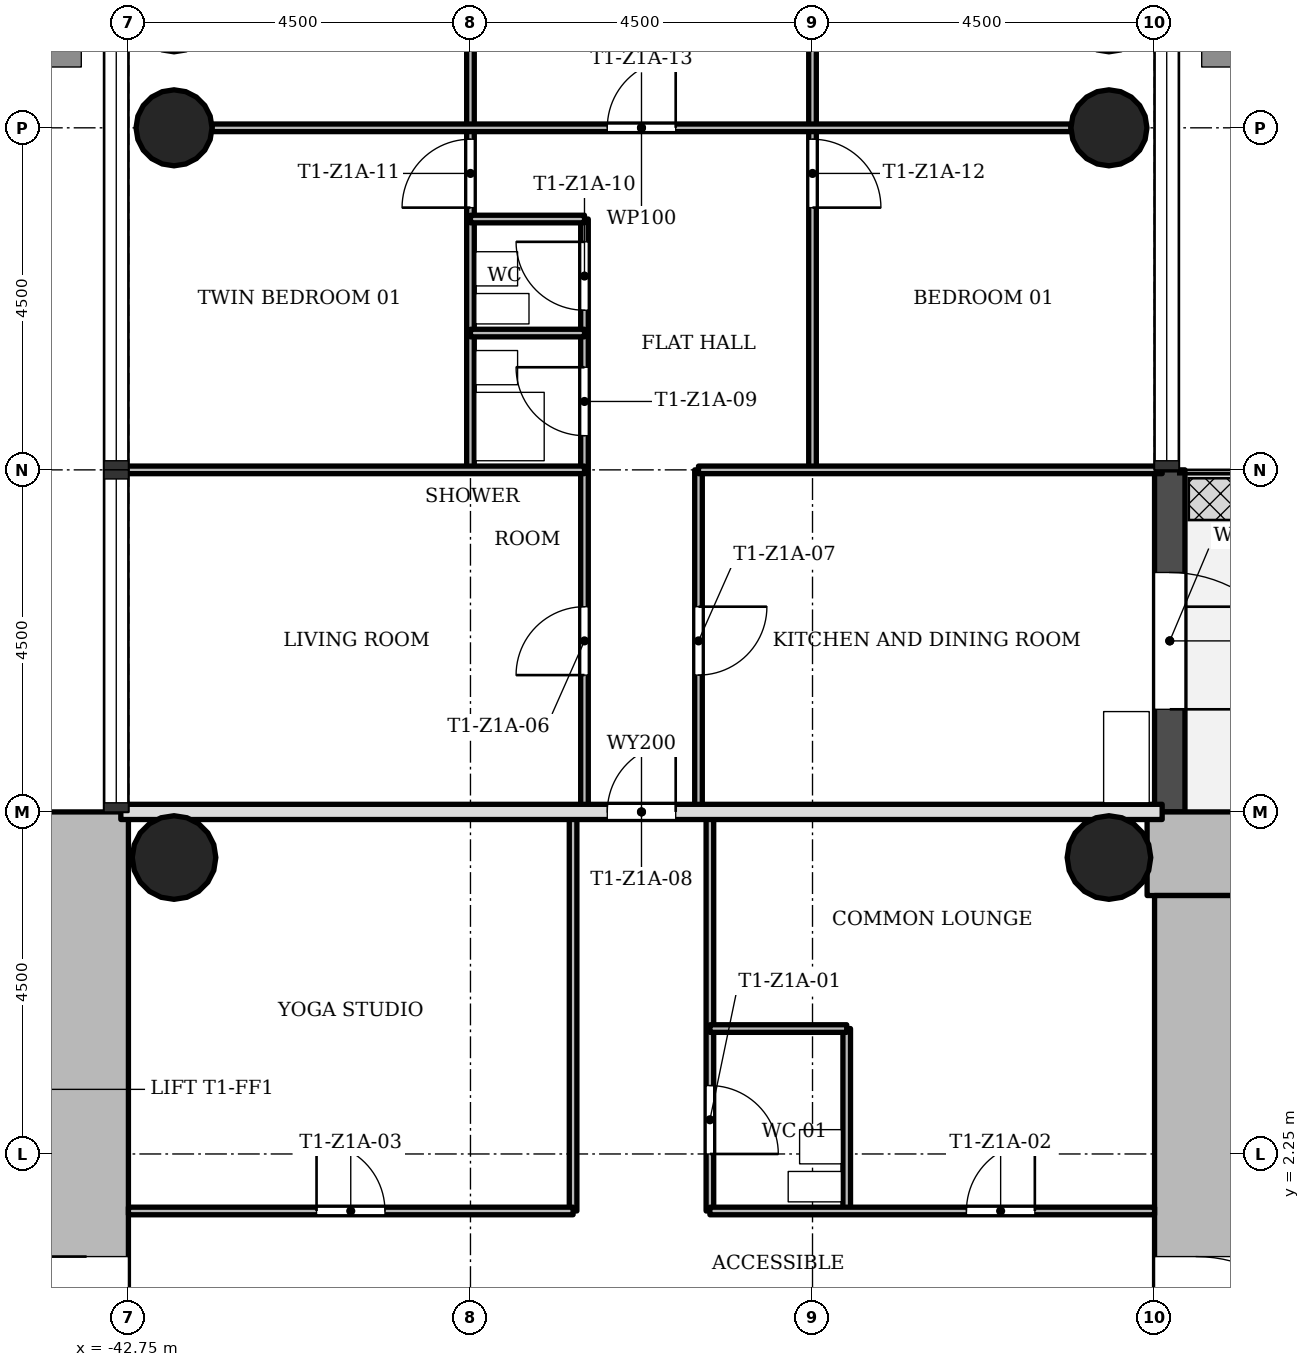
"""IFC4 building model, lengths in metres.
Left out: names, types, materials, properties, quantities, classifications, styles, units other than length and angle.
Written with IfcOpenShell. Run it as: python <this file> out.ifc"""

import sys

from ifc_helpers import new_model, si_unit, direction, frame, frame_2d, origin, origin_2d, place, context, subcontext, project, spatial, rectangle, hollow_circle, extrude, element, fill, save


model = new_model("IFC4")
c1 = context("Model", 3, precision=1e-05, world=origin(), true_north=direction((0.0, 1.0)))
c2 = subcontext(c1, "Body", "Model", "MODEL_VIEW")
j1 = project(units=[si_unit("LENGTHUNIT", "METRE"), si_unit("PLANEANGLEUNIT", "RADIAN")], contexts=[c1])
p1 = place(None, origin())
s1 = spatial("IfcSite", under=j1, at=p1, CompositionType="ELEMENT")
p2 = place(p1, origin())
s2 = spatial("IfcBuilding", under=s1, at=p2, CompositionType="ELEMENT")
p3 = place(p2, frame((0.0, 0.0, 24.5)))
s3 = spatial("IfcBuildingStorey", under=s2, at=p3, CompositionType="ELEMENT", Elevation=24.5)
p4 = place(p3, frame((-21.35, 6.2, 0.0), z_axis=(0.0, 0.0, 1.0), x_axis=(-1.0, 0.0, 0.0)))
e1 = element("IfcWall", 1, at=p4, inside=s3, PredefinedType="SHEAR", context=c2, shape_type="SweptSolid", body=[
    extrude(rectangle(XDim=7.998, YDim=1.1, at=frame_2d((3.999, 0.0))), origin(), (0.0, 0.0, 1.0), 3.4),
])
p5 = place(p3, frame((-28.7, 5.65, 0.0), z_axis=(0.0, 0.0, 1.0), x_axis=(0.0, -1.0, 0.0)))
e2 = element("IfcWall", 2, at=p5, inside=s3, PredefinedType="SHEAR", context=c2, shape_type="SweptSolid", body=[
    extrude(rectangle(XDim=12.4, YDim=1.1, at=frame_2d((6.2, 0.0))), origin(), (0.0, 0.0, 1.0), 3.4),
])
p6 = place(p5, frame((4.75, 0.0, 0.0)))
e3 = element("IfcOpeningElement", 3, at=p6, cuts=e2, PredefinedType="OPENING", context=c2, shape_type="SweptSolid", body=[
    extrude(rectangle(XDim=1.8, YDim=2.1, at=frame_2d((0.9, 1.05))), frame((0.0, 0.56, 0.0), z_axis=(0.0, -1.0, 0.0), x_axis=(1.0, 0.0, 0.0)), (0.0, 0.0, 1.0), 1.12),
])
p7 = place(p3, frame((-43.3, -5.65, 0.0), z_axis=(0.0, 0.0, 1.0), x_axis=(0.0, 1.0, 0.0)))
e4 = element("IfcWall", 4, at=p7, inside=s3, PredefinedType="SHEAR", context=c2, shape_type="SweptSolid", body=[
    extrude(rectangle(XDim=12.4, YDim=1.1, at=frame_2d((6.2, 0.0))), origin(), (0.0, 0.0, 1.0), 3.4),
])
p8 = place(p7, frame((4.75, 0.0, 0.0)))
e5 = element("IfcOpeningElement", 5, at=p8, cuts=e4, PredefinedType="OPENING", context=c2, shape_type="SweptSolid", body=[
    extrude(rectangle(XDim=1.8, YDim=2.1, at=frame_2d((0.9, 1.05))), frame((0.0, 0.56, 0.0), z_axis=(0.0, -1.0, 0.0), x_axis=(1.0, 0.0, 0.0)), (0.0, 0.0, 1.0), 1.12),
])
for number, where, z_axis, x_axis in (
    (6, (-29.85, 15.75, 0.0), (0.0, 0.0, 1.0), (1.0, 0.0, 0.0)),
    (7, (-42.15, 15.75, 0.0), (0.0, 0.0, 1.0), (1.0, 0.0, 0.0)),
):
    element("IfcColumn", number, at=place(p3, frame(where, z_axis=z_axis, x_axis=x_axis)), inside=s3, PredefinedType="COLUMN", context=c2, shape_type="SweptSolid", body=[
        extrude(hollow_circle(Radius=0.5, WallThickness=0.036, at=origin_2d()), origin(), (0.0, 0.0, 1.0), 3.4),
    ])
for number, where, z_axis, x_axis in (
    (8, (-29.85, 6.15, 0.0), (0.0, 0.0, 1.0), (1.0, 0.0, 0.0)),
    (9, (-42.15, 6.15, 0.0), (0.0, 0.0, 1.0), (1.0, 0.0, 0.0)),
):
    element("IfcColumn", number, at=place(p3, frame(where, z_axis=z_axis, x_axis=x_axis)), inside=s3, PredefinedType="COLUMN", context=c2, shape_type="SweptSolid", body=[
        extrude(hollow_circle(Radius=0.55, WallThickness=0.04, at=origin_2d()), origin(), (0.0, 0.0, 1.0), 3.4),
    ])
p9 = place(p3, frame((-29.05, 6.75, 0.0), z_axis=(0.0, 0.0, 1.0), x_axis=(0.0, 1.0, 0.0)))
e10 = element("IfcWall", 10, at=p9, inside=s3, PredefinedType="STANDARD", context=c2, shape_type="SweptSolid", body=[
    extrude(rectangle(XDim=4.5, YDim=0.4, at=frame_2d((2.25, 0.0))), origin(), (0.0, 0.0, 1.0), 3.1),
])
p10 = place(p9, frame((1.35, 0.0, 0.0)))
e11 = element("IfcOpeningElement", 11, at=p10, cuts=e10, PredefinedType="OPENING", context=c2, shape_type="SweptSolid", body=[
    extrude(rectangle(XDim=1.8, YDim=2.1, at=frame_2d((0.9, 1.05))), frame((0.0, 0.21, 0.0), z_axis=(0.0, -1.0, 0.0), x_axis=(1.0, 0.0, 0.0)), (0.0, 0.0, 1.0), 0.42),
])
p11 = place(p3, frame((-38.25, 11.25, 0.0), z_axis=(0.0, 0.0, 1.0), x_axis=(0.0, 1.0, 0.0)))
e12 = element("IfcWall", 12, at=p11, inside=s3, PredefinedType="PARTITIONING", context=c2, shape_type="SweptSolid", body=[
    extrude(rectangle(XDim=9.1, YDim=0.1, at=frame_2d((4.55, 0.0))), origin(), (0.0, 0.0, 1.0), 3.0),
])
p12 = place(p11, frame((3.45, 0.0, 0.0)))
e13 = element("IfcOpeningElement", 13, at=p12, cuts=e12, PredefinedType="OPENING", context=c2, shape_type="SweptSolid", body=[
    extrude(rectangle(XDim=0.9, YDim=2.1, at=frame_2d((0.45, 1.05))), frame((0.0, 0.06, 0.0), z_axis=(0.0, -1.0, 0.0), x_axis=(1.0, 0.0, 0.0)), (0.0, 0.0, 1.0), 0.12),
])
p13 = place(p11, frame((5.55, 0.0, 0.0)))
e14 = element("IfcOpeningElement", 14, at=p13, cuts=e12, PredefinedType="OPENING", context=c2, shape_type="SweptSolid", body=[
    extrude(rectangle(XDim=0.9, YDim=2.1, at=frame_2d((0.45, 1.05))), frame((0.0, 0.06, 0.0), z_axis=(0.0, -1.0, 0.0), x_axis=(1.0, 0.0, 0.0)), (0.0, 0.0, 1.0), 0.12),
])
p14 = place(p3, frame((-36.9, 1.5, 0.0), z_axis=(0.0, 0.0, 1.0), x_axis=(0.0, 1.0, 0.0)))
e15 = element("IfcWall", 15, at=p14, inside=s3, PredefinedType="PARTITIONING", context=c2, shape_type="SweptSolid", body=[
    extrude(rectangle(XDim=5.25, YDim=0.1, at=frame_2d((2.625, 0.0))), origin(), (0.0, 0.0, 1.0), 3.0),
])
p15 = place(p3, frame((-36.75, 6.75, 0.0), z_axis=(0.0, 0.0, 1.0), x_axis=(0.0, 1.0, 0.0)))
e16 = element("IfcWall", 16, at=p15, inside=s3, PredefinedType="PARTITIONING", context=c2, shape_type="SweptSolid", body=[
    extrude(rectangle(XDim=7.8, YDim=0.1, at=frame_2d((3.9, 0.0))), origin(), (0.0, 0.0, 1.0), 3.0),
])
p16 = place(p15, frame((1.8, 0.0, 0.0)))
e17 = element("IfcOpeningElement", 17, at=p16, cuts=e16, PredefinedType="OPENING", context=c2, shape_type="SweptSolid", body=[
    extrude(rectangle(XDim=0.9, YDim=2.1, at=frame_2d((0.45, 1.05))), frame((0.0, 0.06, 0.0), z_axis=(0.0, -1.0, 0.0), x_axis=(1.0, 0.0, 0.0)), (0.0, 0.0, 1.0), 0.12),
])
p17 = place(p15, frame((4.95, 0.0, 0.0)))
e18 = element("IfcOpeningElement", 18, at=p17, cuts=e16, PredefinedType="OPENING", context=c2, shape_type="SweptSolid", body=[
    extrude(rectangle(XDim=0.9, YDim=2.1, at=frame_2d((0.45, 1.05))), frame((0.0, 0.06, 0.0), z_axis=(0.0, -1.0, 0.0), x_axis=(1.0, 0.0, 0.0)), (0.0, 0.0, 1.0), 0.12),
])
p18 = place(p15, frame((6.6, 0.0, 0.0)))
e19 = element("IfcOpeningElement", 19, at=p18, cuts=e16, PredefinedType="OPENING", context=c2, shape_type="SweptSolid", body=[
    extrude(rectangle(XDim=0.9, YDim=2.1, at=frame_2d((0.45, 1.05))), frame((0.0, 0.06, 0.0), z_axis=(0.0, -1.0, 0.0), x_axis=(1.0, 0.0, 0.0)), (0.0, 0.0, 1.0), 0.12),
])
p19 = place(p3, frame((-35.25, 6.75, 0.0), z_axis=(0.0, 0.0, 1.0), x_axis=(0.0, 1.0, 0.0)))
e20 = element("IfcWall", 20, at=p19, inside=s3, PredefinedType="PARTITIONING", context=c2, shape_type="SweptSolid", body=[
    extrude(rectangle(XDim=4.5, YDim=0.1, at=frame_2d((2.25, 0.0))), origin(), (0.0, 0.0, 1.0), 3.0),
])
p20 = place(p19, frame((1.8, 0.0, 0.0)))
e21 = element("IfcOpeningElement", 21, at=p20, cuts=e20, PredefinedType="OPENING", context=c2, shape_type="SweptSolid", body=[
    extrude(rectangle(XDim=0.9, YDim=2.1, at=frame_2d((0.45, 1.05))), frame((0.0, 0.06, 0.0), z_axis=(0.0, -1.0, 0.0), x_axis=(1.0, 0.0, 0.0)), (0.0, 0.0, 1.0), 0.12),
])
p21 = place(p3, frame((-35.1, 1.5, 0.0), z_axis=(0.0, 0.0, 1.0), x_axis=(0.0, 1.0, 0.0)))
e22 = element("IfcWall", 22, at=p21, inside=s3, PredefinedType="PARTITIONING", context=c2, shape_type="SweptSolid", body=[
    extrude(rectangle(XDim=5.25, YDim=0.1, at=frame_2d((2.625, 0.0))), origin(), (0.0, 0.0, 1.0), 3.0),
])
p22 = place(p21, frame((0.75, 0.0, 0.0)))
e23 = element("IfcOpeningElement", 23, at=p22, cuts=e22, PredefinedType="OPENING", context=c2, shape_type="SweptSolid", body=[
    extrude(rectangle(XDim=0.9, YDim=2.1, at=frame_2d((0.45, 1.05))), frame((0.0, 0.06, 0.0), z_axis=(0.0, -1.0, 0.0), x_axis=(1.0, 0.0, 0.0)), (0.0, 0.0, 1.0), 0.12),
])
p23 = place(p3, frame((-33.75, 11.25, 0.0), z_axis=(0.0, 0.0, 1.0), x_axis=(0.0, 1.0, 0.0)))
e24 = element("IfcWall", 24, at=p23, inside=s3, PredefinedType="PARTITIONING", context=c2, shape_type="SweptSolid", body=[
    extrude(rectangle(XDim=9.1, YDim=0.1, at=frame_2d((4.55, 0.0))), origin(), (0.0, 0.0, 1.0), 3.0),
])
p24 = place(p23, frame((3.45, 0.0, 0.0)))
e25 = element("IfcOpeningElement", 25, at=p24, cuts=e24, PredefinedType="OPENING", context=c2, shape_type="SweptSolid", body=[
    extrude(rectangle(XDim=0.9, YDim=2.1, at=frame_2d((0.45, 1.05))), frame((0.0, 0.06, 0.0), z_axis=(0.0, -1.0, 0.0), x_axis=(1.0, 0.0, 0.0)), (0.0, 0.0, 1.0), 0.12),
])
p25 = place(p23, frame((5.55, 0.0, 0.0)))
e26 = element("IfcOpeningElement", 26, at=p25, cuts=e24, PredefinedType="OPENING", context=c2, shape_type="SweptSolid", body=[
    extrude(rectangle(XDim=0.9, YDim=2.1, at=frame_2d((0.45, 1.05))), frame((0.0, 0.06, 0.0), z_axis=(0.0, -1.0, 0.0), x_axis=(1.0, 0.0, 0.0)), (0.0, 0.0, 1.0), 0.12),
])
p26 = place(p3, frame((-33.3, 1.5, 0.0), z_axis=(0.0, 0.0, 1.0), x_axis=(0.0, 1.0, 0.0)))
e27 = element("IfcWall", 27, at=p26, inside=s3, PredefinedType="PARTITIONING", context=c2, shape_type="SweptSolid", body=[
    extrude(rectangle(XDim=2.4, YDim=0.1, at=frame_2d((1.2, 0.0))), origin(), (0.0, 0.0, 1.0), 3.0),
])
p27 = place(p3, frame((-42.75, 1.5, 0.0), z_axis=(0.0, 0.0, 1.0), x_axis=(1.0, 0.0, 0.0)))
e28 = element("IfcWall", 28, at=p27, inside=s3, PredefinedType="PARTITIONING", context=c2, shape_type="SweptSolid", body=[
    extrude(rectangle(XDim=5.85, YDim=0.1, at=frame_2d((2.925, 0.0))), origin(), (0.0, 0.0, 1.0), 3.0),
])
p28 = place(p27, frame((2.475, 0.0, 0.0)))
e29 = element("IfcOpeningElement", 29, at=p28, cuts=e28, PredefinedType="OPENING", context=c2, shape_type="SweptSolid", body=[
    extrude(rectangle(XDim=0.9, YDim=2.1, at=frame_2d((0.45, 1.05))), frame((0.0, 0.06, 0.0), z_axis=(0.0, -1.0, 0.0), x_axis=(1.0, 0.0, 0.0)), (0.0, 0.0, 1.0), 0.12),
])
p29 = place(p3, frame((-35.1, 1.5, 0.0), z_axis=(0.0, 0.0, 1.0), x_axis=(1.0, 0.0, 0.0)))
e30 = element("IfcWall", 30, at=p29, inside=s3, PredefinedType="PARTITIONING", context=c2, shape_type="SweptSolid", body=[
    extrude(rectangle(XDim=5.85, YDim=0.1, at=frame_2d((2.925, 0.0))), origin(), (0.0, 0.0, 1.0), 3.0),
])
p30 = place(p29, frame((3.375, 0.0, 0.0)))
e31 = element("IfcOpeningElement", 31, at=p30, cuts=e30, PredefinedType="OPENING", context=c2, shape_type="SweptSolid", body=[
    extrude(rectangle(XDim=0.9, YDim=2.1, at=frame_2d((0.45, 1.05))), frame((0.0, 0.06, 0.0), z_axis=(0.0, -1.0, 0.0), x_axis=(1.0, 0.0, 0.0)), (0.0, 0.0, 1.0), 0.12),
])
p31 = place(p3, frame((-35.1, 3.9, 0.0), z_axis=(0.0, 0.0, 1.0), x_axis=(1.0, 0.0, 0.0)))
e32 = element("IfcWall", 32, at=p31, inside=s3, PredefinedType="PARTITIONING", context=c2, shape_type="SweptSolid", body=[
    extrude(rectangle(XDim=1.8, YDim=0.1, at=frame_2d((0.9, 0.0))), origin(), (0.0, 0.0, 1.0), 3.0),
])
p32 = place(p3, frame((-42.85, 6.75, 0.0), z_axis=(0.0, 0.0, 1.0), x_axis=(1.0, 0.0, 0.0)))
e33 = element("IfcWall", 33, at=p32, inside=s3, PredefinedType="SOLIDWALL", context=c2, shape_type="SweptSolid", body=[
    extrude(rectangle(XDim=13.7, YDim=0.2, at=frame_2d((6.85, 0.0))), origin(), (0.0, 0.0, 1.0), 3.0),
])
p33 = place(p32, frame((6.4, 0.0, 0.0)))
e34 = element("IfcOpeningElement", 34, at=p33, cuts=e33, PredefinedType="OPENING", context=c2, shape_type="SweptSolid", body=[
    extrude(rectangle(XDim=0.9, YDim=2.1, at=frame_2d((0.45, 1.05))), frame((0.0, 0.11, 0.0), z_axis=(0.0, -1.0, 0.0), x_axis=(1.0, 0.0, 0.0)), (0.0, 0.0, 1.0), 0.22),
])
for number, where, z_axis, x_axis in (
    (35, (-42.85, 11.25, 0.0), (0.0, 0.0, 1.0), (1.0, 0.0, 0.0)),
    (36, (-35.25, 11.25, 0.0), (0.0, 0.0, 1.0), (1.0, 0.0, 0.0)),
):
    element("IfcWall", number, at=place(p3, frame(where, z_axis=z_axis, x_axis=x_axis)), inside=s3, PredefinedType="PARTITIONING", context=c2, shape_type="SweptSolid", body=[
        extrude(rectangle(XDim=6.1, YDim=0.1, at=frame_2d((3.05, 0.0))), origin(), (0.0, 0.0, 1.0), 3.0),
    ])
for number, where, z_axis, x_axis in (
    (37, (-38.25, 13.05, 0.0), (0.0, 0.0, 1.0), (1.0, 0.0, 0.0)),
    (38, (-38.25, 14.55, 0.0), (0.0, 0.0, 1.0), (1.0, 0.0, 0.0)),
):
    element("IfcWall", number, at=place(p3, frame(where, z_axis=z_axis, x_axis=x_axis)), inside=s3, PredefinedType="PARTITIONING", context=c2, shape_type="SweptSolid", body=[
        extrude(rectangle(XDim=1.5, YDim=0.1, at=frame_2d((0.75, 0.0))), origin(), (0.0, 0.0, 1.0), 3.0),
    ])
p34 = place(p3, frame((-41.65, 15.75, 0.0), z_axis=(0.0, 0.0, 1.0), x_axis=(1.0, 0.0, 0.0)))
e39 = element("IfcWall", 39, at=p34, inside=s3, PredefinedType="PARTITIONING", context=c2, shape_type="SweptSolid", body=[
    extrude(rectangle(XDim=11.3, YDim=0.1, at=frame_2d((5.65, 0.0))), origin(), (0.0, 0.0, 1.0), 3.0),
])
p35 = place(p34, frame((5.2, 0.0, 0.0)))
e40 = element("IfcOpeningElement", 40, at=p35, cuts=e39, PredefinedType="OPENING", context=c2, shape_type="SweptSolid", body=[
    extrude(rectangle(XDim=0.9, YDim=2.1, at=frame_2d((0.45, 1.05))), frame((0.0, 0.06, 0.0), z_axis=(0.0, -1.0, 0.0), x_axis=(1.0, 0.0, 0.0)), (0.0, 0.0, 1.0), 0.12),
])
p36 = place(p10, origin())
e41 = element("IfcDoor", 41, at=p36, inside=s3, OperationType="SINGLE_SWING_LEFT", PredefinedType="DOOR", context=c2, shape_type="SweptSolid", body=[
    extrude(rectangle(XDim=1.8, YDim=2.1, at=frame_2d((0.9, 1.05))), frame((0.0, 0.025, 0.0), z_axis=(0.0, -1.0, 0.0), x_axis=(1.0, 0.0, 0.0)), (0.0, 0.0, 1.0), 0.05),
])
fill(e11, e41)
p37 = place(p22, origin())
e42 = element("IfcDoor", 42, at=p37, inside=s3, OperationType="SINGLE_SWING_LEFT", PredefinedType="DOOR", context=c2, shape_type="SweptSolid", body=[
    extrude(rectangle(XDim=0.9, YDim=2.1, at=frame_2d((0.45, 1.05))), frame((0.0, 0.025, 0.0), z_axis=(0.0, -1.0, 0.0), x_axis=(1.0, 0.0, 0.0)), (0.0, 0.0, 1.0), 0.05),
])
fill(e23, e42)
p38 = place(p30, origin())
e43 = element("IfcDoor", 43, at=p38, inside=s3, OperationType="SINGLE_SWING_LEFT", PredefinedType="DOOR", context=c2, shape_type="SweptSolid", body=[
    extrude(rectangle(XDim=0.9, YDim=2.1, at=frame_2d((0.45, 1.05))), frame((0.0, 0.025, 0.0), z_axis=(0.0, -1.0, 0.0), x_axis=(1.0, 0.0, 0.0)), (0.0, 0.0, 1.0), 0.05),
])
fill(e31, e43)
p39 = place(p28, origin())
e44 = element("IfcDoor", 44, at=p39, inside=s3, OperationType="SINGLE_SWING_RIGHT", PredefinedType="DOOR", context=c2, shape_type="SweptSolid", body=[
    extrude(rectangle(XDim=0.9, YDim=2.1, at=frame_2d((0.45, 1.05))), frame((0.0, 0.025, 0.0), z_axis=(0.0, -1.0, 0.0), x_axis=(1.0, 0.0, 0.0)), (0.0, 0.0, 1.0), 0.05),
])
fill(e29, e44)
p40 = place(p16, origin())
e45 = element("IfcDoor", 45, at=p40, inside=s3, OperationType="SINGLE_SWING_RIGHT", PredefinedType="DOOR", context=c2, shape_type="SweptSolid", body=[
    extrude(rectangle(XDim=0.9, YDim=2.1, at=frame_2d((0.45, 1.05))), frame((0.0, 0.025, 0.0), z_axis=(0.0, -1.0, 0.0), x_axis=(1.0, 0.0, 0.0)), (0.0, 0.0, 1.0), 0.05),
])
fill(e17, e45)
p41 = place(p20, origin())
e46 = element("IfcDoor", 46, at=p41, inside=s3, OperationType="SINGLE_SWING_RIGHT", PredefinedType="DOOR", context=c2, shape_type="SweptSolid", body=[
    extrude(rectangle(XDim=0.9, YDim=2.1, at=frame_2d((0.45, 1.05))), frame((0.0, 0.025, 0.0), z_axis=(0.0, -1.0, 0.0), x_axis=(1.0, 0.0, 0.0)), (0.0, 0.0, 1.0), 0.05),
])
fill(e21, e46)
p42 = place(p33, origin())
e47 = element("IfcDoor", 47, at=p42, inside=s3, OperationType="SINGLE_SWING_LEFT", PredefinedType="DOOR", context=c2, shape_type="SweptSolid", body=[
    extrude(rectangle(XDim=0.9, YDim=2.1, at=frame_2d((0.45, 1.05))), frame((0.0, 0.025, 0.0), z_axis=(0.0, -1.0, 0.0), x_axis=(1.0, 0.0, 0.0)), (0.0, 0.0, 1.0), 0.05),
])
fill(e34, e47)
p43 = place(p17, origin())
e48 = element("IfcDoor", 48, at=p43, inside=s3, OperationType="SINGLE_SWING_LEFT", PredefinedType="DOOR", context=c2, shape_type="SweptSolid", body=[
    extrude(rectangle(XDim=0.9, YDim=2.1, at=frame_2d((0.45, 1.05))), frame((0.0, 0.025, 0.0), z_axis=(0.0, -1.0, 0.0), x_axis=(1.0, 0.0, 0.0)), (0.0, 0.0, 1.0), 0.05),
])
fill(e18, e48)
p44 = place(p18, origin())
e49 = element("IfcDoor", 49, at=p44, inside=s3, OperationType="SINGLE_SWING_LEFT", PredefinedType="DOOR", context=c2, shape_type="SweptSolid", body=[
    extrude(rectangle(XDim=0.9, YDim=2.1, at=frame_2d((0.45, 1.05))), frame((0.0, 0.025, 0.0), z_axis=(0.0, -1.0, 0.0), x_axis=(1.0, 0.0, 0.0)), (0.0, 0.0, 1.0), 0.05),
])
fill(e19, e49)
p45 = place(p12, origin())
e50 = element("IfcDoor", 50, at=p45, inside=s3, OperationType="SINGLE_SWING_RIGHT", PredefinedType="DOOR", context=c2, shape_type="SweptSolid", body=[
    extrude(rectangle(XDim=0.9, YDim=2.1, at=frame_2d((0.45, 1.05))), frame((0.0, 0.025, 0.0), z_axis=(0.0, -1.0, 0.0), x_axis=(1.0, 0.0, 0.0)), (0.0, 0.0, 1.0), 0.05),
])
fill(e13, e50)
p46 = place(p24, origin())
e51 = element("IfcDoor", 51, at=p46, inside=s3, OperationType="SINGLE_SWING_LEFT", PredefinedType="DOOR", context=c2, shape_type="SweptSolid", body=[
    extrude(rectangle(XDim=0.9, YDim=2.1, at=frame_2d((0.45, 1.05))), frame((0.0, 0.025, 0.0), z_axis=(0.0, -1.0, 0.0), x_axis=(1.0, 0.0, 0.0)), (0.0, 0.0, 1.0), 0.05),
])
fill(e25, e51)
p47 = place(p35, origin())
e52 = element("IfcDoor", 52, at=p47, inside=s3, OperationType="SINGLE_SWING_LEFT", PredefinedType="DOOR", context=c2, shape_type="SweptSolid", body=[
    extrude(rectangle(XDim=0.9, YDim=2.1, at=frame_2d((0.45, 1.05))), frame((0.0, 0.025, 0.0), z_axis=(0.0, -1.0, 0.0), x_axis=(1.0, 0.0, 0.0)), (0.0, 0.0, 1.0), 0.05),
])
fill(e40, e52)
p48 = place(p6, origin())
e53 = element("IfcDoor", 53, at=p48, inside=s3, OperationType="SINGLE_SWING_LEFT", PredefinedType="DOOR", context=c2, shape_type="SweptSolid", body=[
    extrude(rectangle(XDim=1.8, YDim=2.1, at=frame_2d((0.9, 1.05))), frame((0.0, 0.025, 0.0), z_axis=(0.0, -1.0, 0.0), x_axis=(1.0, 0.0, 0.0)), (0.0, 0.0, 1.0), 0.05),
])
fill(e3, e53)
p49 = place(p8, origin())
e54 = element("IfcDoor", 54, at=p49, inside=s3, OperationType="SINGLE_SWING_LEFT", PredefinedType="DOOR", context=c2, shape_type="SweptSolid", body=[
    extrude(rectangle(XDim=1.8, YDim=2.1, at=frame_2d((0.9, 1.05))), frame((0.0, 0.025, 0.0), z_axis=(0.0, -1.0, 0.0), x_axis=(1.0, 0.0, 0.0)), (0.0, 0.0, 1.0), 0.05),
])
fill(e5, e54)
save(model, sys.argv[1])
